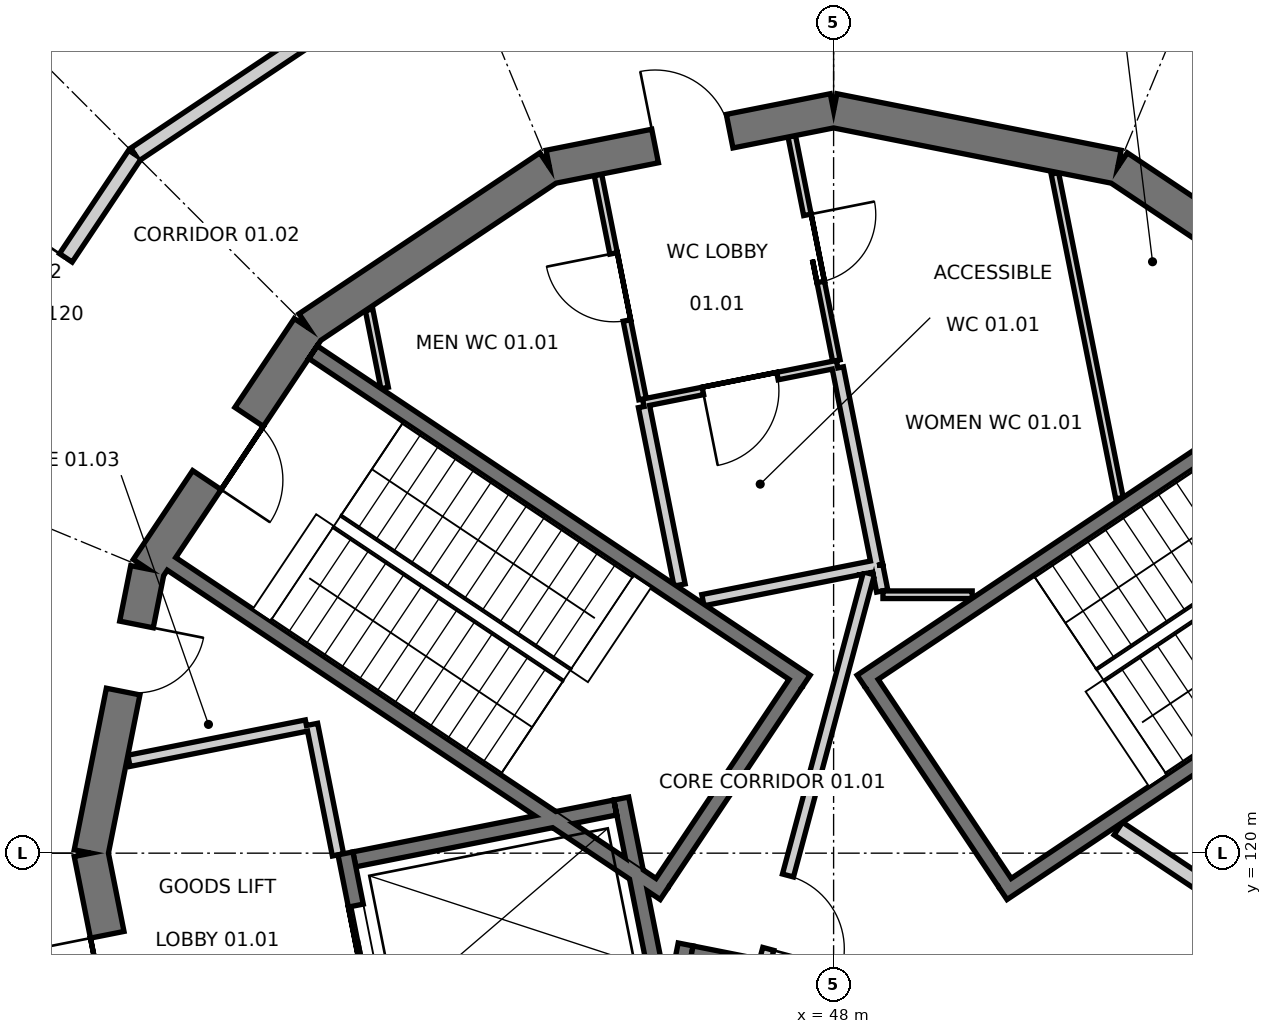
"""IFC4 building model, lengths in metres.
Left out: names, types, materials, properties, quantities, classifications, styles, units other than length and angle.
Written with IfcOpenShell. Run it as: python <this file> out.ifc"""

import sys

from ifc_helpers import new_model, si_unit, direction, frame, frame_2d, origin, place, context, subcontext, project, spatial, polyline, rectangle, outline, extrude, element, fill, save


model = new_model("IFC4")
c1 = context("Model", 3, precision=1e-05, world=origin(), true_north=direction((0.0, 1.0)))
c2 = subcontext(c1, "Body", "Model", "MODEL_VIEW")
j1 = project(units=[si_unit("LENGTHUNIT", "METRE"), si_unit("PLANEANGLEUNIT", "RADIAN")], contexts=[c1])
p1 = place(None, origin())
s1 = spatial("IfcSite", under=j1, at=p1, CompositionType="ELEMENT")
p2 = place(p1, origin())
s2 = spatial("IfcBuilding", under=s1, at=p2, CompositionType="ELEMENT")
p3 = place(p2, frame((0.0, 0.0, 6.0)))
s3 = spatial("IfcBuildingStorey", under=s2, at=p3, CompositionType="ELEMENT", Elevation=6.0)
p4 = place(p3, frame((54.909, 126.909, 0.0), z_axis=(0.0, 0.0, 1.0), x_axis=(-0.83148829117, 0.555542277102, 0.0)))
e1 = element("IfcWall", 1, at=p4, inside=s3, PredefinedType="SHEAR", context=c2, shape_type="SweptSolid", body=[
    extrude(outline(polyline([(-0.045, -0.225), (3.857, -0.225), (3.768, 0.225), (0.045, 0.225), (-0.045, -0.225)])), origin(), (0.0, 0.0, 1.0), 4.8),
])
p5 = place(p4, frame((1.545, 0.0, 0.0)))
e2 = element("IfcOpeningElement", 2, at=p5, cuts=e1, PredefinedType="OPENING", context=c2, shape_type="SweptSolid", body=[
    extrude(rectangle(XDim=0.9, YDim=2.1, at=frame_2d((0.45, 1.05))), frame((0.0, 0.235, 0.0), z_axis=(0.0, -1.0, 0.0), x_axis=(1.0, 0.0, 0.0)), (0.0, 0.0, 1.0), 0.47),
])
p6 = place(p3, frame((51.739, 129.027, 0.0), z_axis=(0.0, 0.0, 1.0), x_axis=(-0.98078948206, 0.195069197673, 0.0)))
e3 = element("IfcWall", 3, at=p6, inside=s3, PredefinedType="SHEAR", context=c2, shape_type="SweptSolid", body=[
    extrude(outline(polyline([(-0.045, -0.225), (3.857, -0.225), (3.768, 0.225), (0.045, 0.225), (-0.045, -0.225)])), origin(), (0.0, 0.0, 1.0), 4.8),
])
p7 = place(p3, frame((48.0, 129.771, 0.0), z_axis=(0.0, 0.0, 1.0), x_axis=(-0.98078948206, -0.195069197673, 0.0)))
e4 = element("IfcWall", 4, at=p7, inside=s3, PredefinedType="SHEAR", context=c2, shape_type="SweptSolid", body=[
    extrude(outline(polyline([(-0.045, -0.225), (3.857, -0.225), (3.768, 0.225), (0.045, 0.225), (-0.045, -0.225)])), origin(), (0.0, 0.0, 1.0), 4.8),
])
p8 = place(p7, frame((1.395, 0.0, 0.0)))
e5 = element("IfcOpeningElement", 5, at=p8, cuts=e4, PredefinedType="OPENING", context=c2, shape_type="SweptSolid", body=[
    extrude(rectangle(XDim=1.0, YDim=2.1, at=frame_2d((0.5, 1.05))), frame((0.0, 0.235, 0.0), z_axis=(0.0, -1.0, 0.0), x_axis=(1.0, 0.0, 0.0)), (0.0, 0.0, 1.0), 0.47),
])
p9 = place(p3, frame((44.261, 129.027, 0.0), z_axis=(0.0, 0.0, 1.0), x_axis=(-0.83148829117, -0.555542277102, 0.0)))
e6 = element("IfcWall", 6, at=p9, inside=s3, PredefinedType="SHEAR", context=c2, shape_type="SweptSolid", body=[
    extrude(outline(polyline([(-0.045, -0.225), (3.857, -0.225), (3.768, 0.225), (0.045, 0.225), (-0.045, -0.225)])), origin(), (0.0, 0.0, 1.0), 4.8),
])
p10 = place(p3, frame((41.091, 126.909, 0.0), z_axis=(0.0, 0.0, 1.0), x_axis=(-0.555542277102, -0.83148829117, 0.0)))
e7 = element("IfcWall", 7, at=p10, inside=s3, PredefinedType="SHEAR", context=c2, shape_type="SweptSolid", body=[
    extrude(outline(polyline([(-0.045, -0.225), (3.857, -0.225), (3.768, 0.225), (0.045, 0.225), (-0.045, -0.225)])), origin(), (0.0, 0.0, 1.0), 4.8),
])
p11 = place(p10, frame((1.406, 0.0, 0.0)))
e8 = element("IfcOpeningElement", 8, at=p11, cuts=e7, PredefinedType="OPENING", context=c2, shape_type="SweptSolid", body=[
    extrude(rectangle(XDim=1.0, YDim=2.1, at=frame_2d((0.5, 1.05))), frame((0.0, 0.235, 0.0), z_axis=(0.0, -1.0, 0.0), x_axis=(1.0, 0.0, 0.0)), (0.0, 0.0, 1.0), 0.47),
])
p12 = place(p3, frame((38.973, 123.739, 0.0), z_axis=(0.0, 0.0, 1.0), x_axis=(-0.195069197673, -0.98078948206, 0.0)))
e9 = element("IfcWall", 9, at=p12, inside=s3, PredefinedType="SHEAR", context=c2, shape_type="SweptSolid", body=[
    extrude(outline(polyline([(-0.045, -0.225), (3.857, -0.225), (3.768, 0.225), (0.045, 0.225), (-0.045, -0.225)])), origin(), (0.0, 0.0, 1.0), 4.8),
])
p13 = place(p12, frame((0.745, 0.0, 0.0)))
e10 = element("IfcOpeningElement", 10, at=p13, cuts=e9, PredefinedType="OPENING", context=c2, shape_type="SweptSolid", body=[
    extrude(rectangle(XDim=0.9, YDim=2.1, at=frame_2d((0.45, 1.05))), frame((0.0, 0.235, 0.0), z_axis=(0.0, -1.0, 0.0), x_axis=(1.0, 0.0, 0.0)), (0.0, 0.0, 1.0), 0.47),
])
p14 = place(p3, frame((38.229, 120.0, 0.0), z_axis=(0.0, 0.0, 1.0), x_axis=(0.195069197673, -0.98078948206, 0.0)))
e11 = element("IfcWall", 11, at=p14, inside=s3, PredefinedType="SHEAR", context=c2, shape_type="SweptSolid", body=[
    extrude(outline(polyline([(-0.045, -0.225), (3.857, -0.225), (3.768, 0.225), (0.045, 0.225), (-0.045, -0.225)])), origin(), (0.0, 0.0, 1.0), 4.8),
])
p15 = place(p14, frame((1.095, 0.0, 0.0)))
e12 = element("IfcOpeningElement", 12, at=p15, cuts=e11, PredefinedType="OPENING", context=c2, shape_type="SweptSolid", body=[
    extrude(rectangle(XDim=1.6, YDim=2.1, at=frame_2d((0.8, 1.05))), frame((0.0, 0.235, 0.0), z_axis=(0.0, -1.0, 0.0), x_axis=(1.0, 0.0, 0.0)), (0.0, 0.0, 1.0), 0.47),
])
p16 = place(p3, frame((48.365, 122.258, 0.0), z_axis=(0.0, 0.0, 1.0), x_axis=(0.831476803301, 0.555559470779, 0.0)))
e13 = element("IfcWall", 13, at=p16, inside=s3, PredefinedType="SHEAR", context=c2, shape_type="SweptSolid", body=[
    extrude(rectangle(XDim=7.8, YDim=0.2, at=frame_2d((3.9, 0.0))), origin(), (0.0, 0.0, 1.0), 4.8),
])
p17 = place(p3, frame((50.226, 119.473, 0.0), z_axis=(0.0, 0.0, 1.0), x_axis=(0.831486463828, 0.555545012102, 0.0)))
e14 = element("IfcWall", 14, at=p17, inside=s3, PredefinedType="SHEAR", context=c2, shape_type="SweptSolid", body=[
    extrude(rectangle(XDim=7.8, YDim=0.2, at=frame_2d((3.9, 0.0))), origin(), (0.0, 0.0, 1.0), 4.8),
])
p18 = place(p3, frame((50.253, 119.612, 0.0), z_axis=(0.0, 0.0, 1.0), x_axis=(-0.55555842186, 0.831477504146, 0.0)))
e15 = element("IfcWall", 15, at=p18, inside=s3, PredefinedType="SHEAR", context=c2, shape_type="SweptSolid", body=[
    extrude(rectangle(XDim=3.15, YDim=0.2, at=frame_2d((1.575, 0.0))), origin(), (0.0, 0.0, 1.0), 4.8),
])
p19 = place(p3, frame((45.774, 119.473, 0.0), z_axis=(0.0, 0.0, 1.0), x_axis=(-0.831486463828, 0.555545012102, 0.0)))
e16 = element("IfcWall", 16, at=p19, inside=s3, PredefinedType="SHEAR", context=c2, shape_type="SweptSolid", body=[
    extrude(rectangle(XDim=7.8, YDim=0.2, at=frame_2d((3.9, 0.0))), origin(), (0.0, 0.0, 1.0), 4.8),
])
p20 = place(p3, frame((47.635, 122.258, 0.0), z_axis=(0.0, 0.0, 1.0), x_axis=(-0.831476803301, 0.555559470779, 0.0)))
e17 = element("IfcWall", 17, at=p20, inside=s3, PredefinedType="SHEAR", context=c2, shape_type="SweptSolid", body=[
    extrude(rectangle(XDim=7.8, YDim=0.2, at=frame_2d((3.9, 0.0))), origin(), (0.0, 0.0, 1.0), 4.8),
])
p21 = place(p3, frame((47.497, 122.231, 0.0), z_axis=(0.0, 0.0, 1.0), x_axis=(-0.55555842186, -0.831477504146, 0.0)))
e18 = element("IfcWall", 18, at=p21, inside=s3, PredefinedType="SHEAR", context=c2, shape_type="SweptSolid", body=[
    extrude(rectangle(XDim=3.15, YDim=0.2, at=frame_2d((1.575, 0.0))), origin(), (0.0, 0.0, 1.0), 4.8),
])
p22 = place(p3, frame((46.053, 118.799, 0.0), z_axis=(0.0, 0.0, 1.0), x_axis=(-0.195092759861, -0.980784795483, 0.0)))
e19 = element("IfcWall", 19, at=p22, inside=s3, PredefinedType="SHEAR", context=c2, shape_type="SweptSolid", body=[
    extrude(rectangle(XDim=7.8, YDim=0.2, at=frame_2d((3.9, 0.0))), origin(), (0.0, 0.0, 1.0), 4.8),
])
p23 = place(p3, frame((46.132, 118.681, 0.0), z_axis=(0.0, 0.0, 1.0), x_axis=(0.980785830564, -0.195087556151, 0.0)))
e20 = element("IfcWall", 20, at=p23, inside=s3, PredefinedType="SHEAR", context=c2, shape_type="SweptSolid", body=[
    extrude(rectangle(XDim=3.15, YDim=0.2, at=frame_2d((1.575, 0.0))), origin(), (0.0, 0.0, 1.0), 4.8),
])
p24 = place(p3, frame((41.577, 119.997, 0.0), z_axis=(0.0, 0.0, 1.0), x_axis=(0.195120673769, -0.980779242576, 0.0)))
e21 = element("IfcWall", 21, at=p24, inside=s3, PredefinedType="SHEAR", context=c2, shape_type="SweptSolid", body=[
    extrude(rectangle(XDim=2.5, YDim=0.2, at=frame_2d((1.25, 0.0))), origin(), (0.0, 0.0, 1.0), 4.8),
])
p25 = place(p24, frame((0.7, 0.0, 0.0)))
e22 = element("IfcOpeningElement", 22, at=p25, cuts=e21, PredefinedType="OPENING", context=c2, shape_type="SweptSolid", body=[
    extrude(rectangle(XDim=1.1, YDim=2.1, at=frame_2d((0.55, 1.05))), frame((0.0, 0.11, 0.0), z_axis=(0.0, -1.0, 0.0), x_axis=(1.0, 0.0, 0.0)), (0.0, 0.0, 1.0), 0.22),
])
p26 = place(p3, frame((45.206, 120.719, 0.0), z_axis=(0.0, 0.0, 1.0), x_axis=(0.195158270522, -0.980771762158, 0.0)))
e23 = element("IfcWall", 23, at=p26, inside=s3, PredefinedType="SHEAR", context=c2, shape_type="SweptSolid", body=[
    extrude(rectangle(XDim=2.647, YDim=0.2, at=frame_2d((1.323, 0.0))), origin(), (0.0, 0.0, 1.0), 4.8),
])
p27 = place(p3, frame((45.127, 120.601, 0.0), z_axis=(0.0, 0.0, 1.0), x_axis=(-0.980794727808, -0.195042820694, 0.0)))
e24 = element("IfcWall", 24, at=p27, inside=s3, PredefinedType="SHEAR", context=c2, shape_type="SweptSolid", body=[
    extrude(rectangle(XDim=3.5, YDim=0.2, at=frame_2d((1.75, 0.0))), origin(), (0.0, 0.0, 1.0), 4.8),
])
p28 = place(p3, frame((55.126, 118.065, 0.0), z_axis=(0.0, 0.0, 1.0), x_axis=(-0.831495502265, 0.555531483998, 0.0)))
e25 = element("IfcWall", 25, at=p28, inside=s3, PredefinedType="SOLIDWALL", context=c2, shape_type="SweptSolid", body=[
    extrude(rectangle(XDim=4.065, YDim=0.2, at=frame_2d((2.033, 0.0))), origin(), (0.0, 0.0, 1.0), 4.5),
])
p29 = place(p3, frame((41.479, 119.977, 0.0), z_axis=(0.0, 0.0, 1.0), x_axis=(-0.19501613536, 0.98080003413, 0.0)))
e26 = element("IfcWall", 26, at=p29, inside=s3, PredefinedType="PARTITIONING", context=c2, shape_type="SweptSolid", body=[
    extrude(rectangle(XDim=1.75, YDim=0.15, at=frame_2d((0.875, 0.0))), origin(), (0.0, 0.0, 1.0), 4.5),
])
p30 = place(p3, frame((41.064, 121.679, 0.0), z_axis=(0.0, 0.0, 1.0), x_axis=(-0.980781272394, -0.195110470559, 0.0)))
e27 = element("IfcWall", 27, at=p30, inside=s3, PredefinedType="PARTITIONING", context=c2, shape_type="SweptSolid", body=[
    extrude(rectangle(XDim=2.381, YDim=0.15, at=frame_2d((1.19, 0.0))), origin(), (0.0, 0.0, 1.0), 4.5),
])
p31 = place(p3, frame((48.046, 126.433, 0.0), z_axis=(0.0, 0.0, 1.0), x_axis=(-0.980778805994, -0.195122868248, 0.0)))
e28 = element("IfcWall", 28, at=p31, inside=s3, PredefinedType="PARTITIONING", context=c2, shape_type="SweptSolid", body=[
    extrude(rectangle(XDim=2.6, YDim=0.1, at=frame_2d((1.3, 0.0))), origin(), (0.0, 0.0, 1.0), 4.5),
])
p32 = place(p31, frame((0.8, 0.0, 0.0)))
e29 = element("IfcOpeningElement", 29, at=p32, cuts=e28, PredefinedType="OPENING", context=c2, shape_type="SweptSolid", body=[
    extrude(rectangle(XDim=1.0, YDim=2.1, at=frame_2d((0.5, 1.05))), frame((0.0, 0.06, 0.0), z_axis=(0.0, -1.0, 0.0), x_axis=(1.0, 0.0, 0.0)), (0.0, 0.0, 1.0), 0.12),
])
p33 = place(p3, frame((45.486, 125.974, 0.0), z_axis=(0.0, 0.0, 1.0), x_axis=(-0.195054549846, 0.980792395252, 0.0)))
e30 = element("IfcWall", 30, at=p33, inside=s3, PredefinedType="PARTITIONING", context=c2, shape_type="SweptSolid", body=[
    extrude(rectangle(XDim=3.008, YDim=0.1, at=frame_2d((1.504, 0.0))), origin(), (0.0, 0.0, 1.0), 4.5),
])
p34 = place(p33, frame((1.054, 0.0, 0.0)))
e31 = element("IfcOpeningElement", 31, at=p34, cuts=e30, PredefinedType="OPENING", context=c2, shape_type="SweptSolid", body=[
    extrude(rectangle(XDim=0.9, YDim=2.1, at=frame_2d((0.45, 1.05))), frame((0.0, 0.06, 0.0), z_axis=(0.0, -1.0, 0.0), x_axis=(1.0, 0.0, 0.0)), (0.0, 0.0, 1.0), 0.12),
])
p35 = place(p3, frame((47.449, 129.432, 0.0), z_axis=(0.0, 0.0, 1.0), x_axis=(0.195054549846, -0.980792395252, 0.0)))
e32 = element("IfcWall", 32, at=p35, inside=s3, PredefinedType="PARTITIONING", context=c2, shape_type="SweptSolid", body=[
    extrude(rectangle(XDim=3.008, YDim=0.1, at=frame_2d((1.504, 0.0))), origin(), (0.0, 0.0, 1.0), 4.5),
])
p36 = place(p35, frame((1.054, 0.0, 0.0)))
e33 = element("IfcOpeningElement", 33, at=p36, cuts=e32, PredefinedType="OPENING", context=c2, shape_type="SweptSolid", body=[
    extrude(rectangle(XDim=0.9, YDim=2.1, at=frame_2d((0.45, 1.05))), frame((0.0, 0.06, 0.0), z_axis=(0.0, -1.0, 0.0), x_axis=(1.0, 0.0, 0.0)), (0.0, 0.0, 1.0), 0.12),
])
p37 = place(p3, frame((48.056, 126.384, 0.0), z_axis=(0.0, 0.0, 1.0), x_axis=(0.195123903338, -0.980778600065, 0.0)))
e34 = element("IfcWall", 34, at=p37, inside=s3, PredefinedType="PARTITIONING", context=c2, shape_type="SweptSolid", body=[
    extrude(rectangle(XDim=2.65, YDim=0.15, at=frame_2d((1.325, 0.0))), origin(), (0.0, 0.0, 1.0), 4.5),
])
p38 = place(p3, frame((48.524, 123.775, 0.0), z_axis=(0.0, 0.0, 1.0), x_axis=(-0.980777249161, -0.195130693455, 0.0)))
e35 = element("IfcWall", 35, at=p38, inside=s3, PredefinedType="PARTITIONING", context=c2, shape_type="SweptSolid", body=[
    extrude(rectangle(XDim=2.287, YDim=0.15, at=frame_2d((1.144, 0.0))), origin(), (0.0, 0.0, 1.0), 4.5),
])
p39 = place(p3, frame((45.973, 123.528, 0.0), z_axis=(0.0, 0.0, 1.0), x_axis=(-0.195135731435, 0.980776246815, 0.0)))
e36 = element("IfcWall", 36, at=p39, inside=s3, PredefinedType="PARTITIONING", context=c2, shape_type="SweptSolid", body=[
    extrude(rectangle(XDim=2.395, YDim=0.15, at=frame_2d((1.197, 0.0))), origin(), (0.0, 0.0, 1.0), 4.5),
])
p40 = place(p3, frame((42.093, 126.12, 0.0), z_axis=(0.0, 0.0, 1.0), x_axis=(-0.195175461866, 0.980768341192, 0.0)))
e37 = element("IfcWall", 37, at=p40, inside=s3, PredefinedType="PARTITIONING", context=c2, shape_type="SweptSolid", body=[
    extrude(rectangle(XDim=1.048, YDim=0.1, at=frame_2d((0.524, 0.0))), origin(), (0.0, 0.0, 1.0), 4.5),
])
p41 = place(p3, frame((50.911, 128.943, 0.0), z_axis=(0.0, 0.0, 1.0), x_axis=(0.195113868301, -0.980780596462, 0.0)))
e38 = element("IfcWall", 38, at=p41, inside=s3, PredefinedType="PARTITIONING", context=c2, shape_type="SweptSolid", body=[
    extrude(rectangle(XDim=4.357, YDim=0.1, at=frame_2d((2.178, 0.0))), origin(), (0.0, 0.0, 1.0), 4.5),
])
p42 = place(p3, frame((49.823, 123.4, 0.0), z_axis=(0.0, 0.0, 1.0), x_axis=(-1.0, 0.0, 0.0)))
e39 = element("IfcWall", 39, at=p42, inside=s3, PredefinedType="PARTITIONING", context=c2, shape_type="SweptSolid", body=[
    extrude(rectangle(XDim=1.174, YDim=0.1, at=frame_2d((0.587, 0.0))), origin(), (0.0, 0.0, 1.0), 4.5),
])
p43 = place(p3, frame((48.639, 123.449, 0.0), z_axis=(0.0, 0.0, 1.0), x_axis=(-0.194880473507, 0.98082699853, 0.0)))
e40 = element("IfcWall", 40, at=p43, inside=s3, PredefinedType="PARTITIONING", context=c2, shape_type="SweptSolid", body=[
    extrude(rectangle(XDim=0.342, YDim=0.15, at=frame_2d((0.171, 0.0))), origin(), (0.0, 0.0, 1.0), 4.5),
])
p44 = place(p3, frame((47.102, 118.595, 0.0), z_axis=(0.0, 0.0, 1.0), x_axis=(0.258814124304, 0.9659271448, 0.0)))
e41 = element("IfcWall", 41, at=p44, inside=s3, PredefinedType="PARTITIONING", context=c2, shape_type="SweptSolid", body=[
    extrude(rectangle(XDim=5.265, YDim=0.15, at=frame_2d((2.632, 0.0))), origin(), (0.0, 0.0, 1.0), 4.5),
])
p45 = place(p44, frame((0.15, 0.0, 0.0)))
e42 = element("IfcOpeningElement", 42, at=p45, cuts=e41, PredefinedType="OPENING", context=c2, shape_type="SweptSolid", body=[
    extrude(rectangle(XDim=1.0, YDim=2.1, at=frame_2d((0.5, 1.05))), frame((0.0, 0.085, 0.0), z_axis=(0.0, -1.0, 0.0), x_axis=(1.0, 0.0, 0.0)), (0.0, 0.0, 1.0), 0.17),
])
p46 = place(p3, frame((35.99, 124.975, 0.0), z_axis=(0.0, 0.0, 1.0), x_axis=(0.555577354854, 0.831464853601, 0.0)))
e43 = element("IfcWall", 43, at=p46, inside=s3, PredefinedType="SOLIDWALL", context=c2, shape_type="SweptSolid", body=[
    extrude(rectangle(XDim=5.073, YDim=0.2, at=frame_2d((2.536, 0.0))), origin(), (0.0, 0.0, 1.0), 4.5),
])
p47 = place(p46, frame((1.636, 0.0, 0.0)))
e44 = element("IfcOpeningElement", 44, at=p47, cuts=e43, PredefinedType="OPENING", context=c2, shape_type="SweptSolid", body=[
    extrude(rectangle(XDim=1.8, YDim=2.1, at=frame_2d((0.9, 1.05))), frame((0.0, 0.11, 0.0), z_axis=(0.0, -1.0, 0.0), x_axis=(1.0, 0.0, 0.0)), (0.0, 0.0, 1.0), 0.22),
])
p48 = place(p3, frame((38.808, 129.192, 0.0), z_axis=(0.0, 0.0, 1.0), x_axis=(0.831464853601, 0.555577354854, 0.0)))
e45 = element("IfcWall", 45, at=p48, inside=s3, PredefinedType="SOLIDWALL", context=c2, shape_type="SweptSolid", body=[
    extrude(rectangle(XDim=5.073, YDim=0.2, at=frame_2d((2.536, 0.0))), origin(), (0.0, 0.0, 1.0), 4.5),
])
p49 = place(p11, origin())
e46 = element("IfcDoor", 46, at=p49, inside=s3, OperationType="SINGLE_SWING_RIGHT", PredefinedType="DOOR", context=c2, shape_type="SweptSolid", body=[
    extrude(rectangle(XDim=1.0, YDim=2.1, at=frame_2d((0.5, 1.05))), frame((0.0, 0.025, 0.0), z_axis=(0.0, -1.0, 0.0), x_axis=(1.0, 0.0, 0.0)), (0.0, 0.0, 1.0), 0.05),
])
fill(e8, e46)
p50 = place(p25, origin())
e47 = element("IfcDoor", 47, at=p50, inside=s3, OperationType="SLIDING_TO_LEFT", PredefinedType="DOOR", context=c2, shape_type="SweptSolid", body=[
    extrude(rectangle(XDim=1.1, YDim=2.1, at=frame_2d((0.55, 1.05))), frame((0.0, 0.025, 0.0), z_axis=(0.0, -1.0, 0.0), x_axis=(1.0, 0.0, 0.0)), (0.0, 0.0, 1.0), 0.05),
])
fill(e22, e47)
p51 = place(p15, frame((1.6, 0.0, 0.0), z_axis=(0.0, 0.0, 1.0), x_axis=(-1.0, 0.0, 0.0)))
e48 = element("IfcDoor", 48, at=p51, inside=s3, OperationType="DOUBLE_DOOR_SINGLE_SWING", PredefinedType="DOOR", context=c2, shape_type="SweptSolid", body=[
    extrude(rectangle(XDim=1.6, YDim=2.1, at=frame_2d((0.8, 1.05))), frame((0.0, 0.025, 0.0), z_axis=(0.0, -1.0, 0.0), x_axis=(1.0, 0.0, 0.0)), (0.0, 0.0, 1.0), 0.05),
])
fill(e12, e48)
p52 = place(p8, frame((1.0, 0.0, 0.0), z_axis=(0.0, 0.0, 1.0), x_axis=(-1.0, 0.0, 0.0)))
e49 = element("IfcDoor", 49, at=p52, inside=s3, OperationType="SINGLE_SWING_LEFT", PredefinedType="DOOR", context=c2, shape_type="SweptSolid", body=[
    extrude(rectangle(XDim=1.0, YDim=2.1, at=frame_2d((0.5, 1.05))), frame((0.0, 0.025, 0.0), z_axis=(0.0, -1.0, 0.0), x_axis=(1.0, 0.0, 0.0)), (0.0, 0.0, 1.0), 0.05),
])
fill(e5, e49)
p53 = place(p13, origin())
e50 = element("IfcDoor", 50, at=p53, inside=s3, OperationType="SINGLE_SWING_LEFT", PredefinedType="DOOR", context=c2, shape_type="SweptSolid", body=[
    extrude(rectangle(XDim=0.9, YDim=2.1, at=frame_2d((0.45, 1.05))), frame((0.0, 0.025, 0.0), z_axis=(0.0, -1.0, 0.0), x_axis=(1.0, 0.0, 0.0)), (0.0, 0.0, 1.0), 0.05),
])
fill(e10, e50)
p54 = place(p32, origin())
e51 = element("IfcDoor", 51, at=p54, inside=s3, OperationType="SINGLE_SWING_RIGHT", PredefinedType="DOOR", context=c2, shape_type="SweptSolid", body=[
    extrude(rectangle(XDim=1.0, YDim=2.1, at=frame_2d((0.5, 1.05))), frame((0.0, 0.025, 0.0), z_axis=(0.0, -1.0, 0.0), x_axis=(1.0, 0.0, 0.0)), (0.0, 0.0, 1.0), 0.05),
])
fill(e29, e51)
p55 = place(p34, origin())
e52 = element("IfcDoor", 52, at=p55, inside=s3, OperationType="SINGLE_SWING_RIGHT", PredefinedType="DOOR", context=c2, shape_type="SweptSolid", body=[
    extrude(rectangle(XDim=0.9, YDim=2.1, at=frame_2d((0.45, 1.05))), frame((0.0, 0.025, 0.0), z_axis=(0.0, -1.0, 0.0), x_axis=(1.0, 0.0, 0.0)), (0.0, 0.0, 1.0), 0.05),
])
fill(e31, e52)
p56 = place(p36, origin())
e53 = element("IfcDoor", 53, at=p56, inside=s3, OperationType="SINGLE_SWING_LEFT", PredefinedType="DOOR", context=c2, shape_type="SweptSolid", body=[
    extrude(rectangle(XDim=0.9, YDim=2.1, at=frame_2d((0.45, 1.05))), frame((0.0, 0.025, 0.0), z_axis=(0.0, -1.0, 0.0), x_axis=(1.0, 0.0, 0.0)), (0.0, 0.0, 1.0), 0.05),
])
fill(e33, e53)
p57 = place(p45, frame((1.0, 0.0, 0.0), z_axis=(0.0, 0.0, 1.0), x_axis=(-1.0, 0.0, 0.0)))
e54 = element("IfcDoor", 54, at=p57, inside=s3, OperationType="SINGLE_SWING_RIGHT", PredefinedType="DOOR", context=c2, shape_type="SweptSolid", body=[
    extrude(rectangle(XDim=1.0, YDim=2.1, at=frame_2d((0.5, 1.05))), frame((0.0, 0.025, 0.0), z_axis=(0.0, -1.0, 0.0), x_axis=(1.0, 0.0, 0.0)), (0.0, 0.0, 1.0), 0.05),
])
fill(e42, e54)
p58 = place(p47, origin())
e55 = element("IfcDoor", 55, at=p58, inside=s3, OperationType="DOUBLE_DOOR_SINGLE_SWING", PredefinedType="DOOR", context=c2, shape_type="SweptSolid", body=[
    extrude(rectangle(XDim=1.8, YDim=2.1, at=frame_2d((0.9, 1.05))), frame((0.0, 0.025, 0.0), z_axis=(0.0, -1.0, 0.0), x_axis=(1.0, 0.0, 0.0)), (0.0, 0.0, 1.0), 0.05),
])
fill(e44, e55)
save(model, sys.argv[1])
